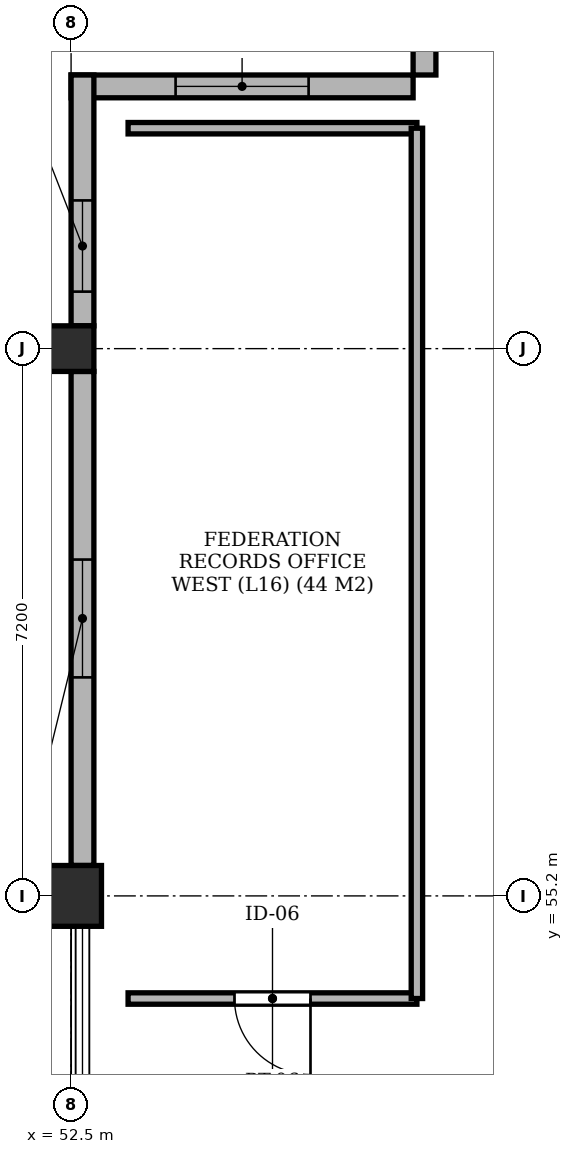
"""IFC4 building model, lengths in metres.
Left out: names, types, materials, properties, quantities, classifications, styles, units other than length and angle.
Written with IfcOpenShell. Run it as: python <this file> out.ifc"""

import sys

from ifc_helpers import new_model, si_unit, direction, frame, frame_2d, origin, origin_2d, place, context, subcontext, project, spatial, rectangle, extrude, element, fill, save


model = new_model("IFC4")
c1 = context("Model", 3, precision=1e-05, world=origin(), true_north=direction((0.0, 1.0)))
c2 = subcontext(c1, "Body", "Model", "MODEL_VIEW")
j1 = project(units=[si_unit("LENGTHUNIT", "METRE"), si_unit("PLANEANGLEUNIT", "RADIAN")], contexts=[c1])
p1 = place(None, origin())
s1 = spatial("IfcSite", under=j1, at=p1, CompositionType="ELEMENT")
p2 = place(p1, origin())
s2 = spatial("IfcBuilding", under=s1, at=p2, CompositionType="ELEMENT")
p3 = place(p2, frame((0.0, 0.0, 63.3)))
s3 = spatial("IfcBuildingStorey", under=s2, at=p3, CompositionType="ELEMENT", Elevation=63.3)
p4 = place(p3, frame((52.5, 55.2, -0.21), z_axis=(0.0, 0.0, 1.0), x_axis=(1.0, 0.0, 0.0)))
e1 = element("IfcColumn", 1, at=p4, inside=s3, PredefinedType="COLUMN", context=c2, shape_type="SweptSolid", body=[
    extrude(rectangle(XDim=0.8, YDim=0.8, at=origin_2d()), origin(), (0.0, 0.0, 1.0), 3.22),
])
p5 = place(p3, frame((52.5, 62.4, -0.21), z_axis=(0.0, 0.0, 1.0), x_axis=(1.0, 0.0, 0.0)))
e2 = element("IfcColumn", 2, at=p5, inside=s3, PredefinedType="COLUMN", context=c2, shape_type="SweptSolid", body=[
    extrude(rectangle(XDim=0.6, YDim=0.6, at=origin_2d()), origin(), (0.0, 0.0, 1.0), 3.22),
])
p6 = place(p3, frame((57.15, 69.6, 0.0), z_axis=(0.0, 0.0, 1.0), x_axis=(0.0, -1.0, 0.0)))
e3 = element("IfcWall", 3, at=p6, inside=s3, PredefinedType="SOLIDWALL", context=c2, shape_type="SweptSolid", body=[
    extrude(rectangle(XDim=3.6, YDim=0.3, at=frame_2d((1.8, 0.0))), origin(), (0.0, 0.0, 1.0), 2.53),
])
p7 = place(p6, frame((1.2, 0.0, 0.62)))
e4 = element("IfcOpeningElement", 4, at=p7, cuts=e3, PredefinedType="OPENING", context=c2, shape_type="SweptSolid", body=[
    extrude(rectangle(XDim=1.2, YDim=1.7, at=frame_2d((0.6, 0.85))), frame((0.0, 0.162, 0.0), z_axis=(0.0, -1.0, 0.0), x_axis=(1.0, 0.0, 0.0)), (0.0, 0.0, 1.0), 0.324),
])
p8 = place(p3, frame((57.0, 65.85, 0.0), z_axis=(0.0, 0.0, 1.0), x_axis=(-1.0, 0.0, 0.0)))
e5 = element("IfcWall", 5, at=p8, inside=s3, PredefinedType="SOLIDWALL", context=c2, shape_type="SweptSolid", body=[
    extrude(rectangle(XDim=4.5, YDim=0.3, at=frame_2d((2.25, 0.0))), origin(), (0.0, 0.0, 1.0), 2.53),
])
p9 = place(p8, frame((1.375, 0.0, 0.62)))
e6 = element("IfcOpeningElement", 6, at=p9, cuts=e5, PredefinedType="OPENING", context=c2, shape_type="SweptSolid", body=[
    extrude(rectangle(XDim=1.75, YDim=1.81, at=frame_2d((0.875, 0.905))), frame((0.0, 0.162, 0.0), z_axis=(0.0, -1.0, 0.0), x_axis=(1.0, 0.0, 0.0)), (0.0, 0.0, 1.0), 0.324),
])
p10 = place(p3, frame((52.65, 66.0, 0.0), z_axis=(0.0, 0.0, 1.0), x_axis=(0.0, -1.0, 0.0)))
e7 = element("IfcWall", 7, at=p10, inside=s3, PredefinedType="SOLIDWALL", context=c2, shape_type="SweptSolid", body=[
    extrude(rectangle(XDim=3.3, YDim=0.3, at=frame_2d((1.65, 0.0))), origin(), (0.0, 0.0, 1.0), 2.53),
])
p11 = place(p10, frame((1.65, 0.0, 0.62)))
e8 = element("IfcOpeningElement", 8, at=p11, cuts=e7, PredefinedType="OPENING", context=c2, shape_type="SweptSolid", body=[
    extrude(rectangle(XDim=1.2, YDim=1.65, at=frame_2d((0.6, 0.825))), frame((0.0, 0.162, 0.0), z_axis=(0.0, -1.0, 0.0), x_axis=(1.0, 0.0, 0.0)), (0.0, 0.0, 1.0), 0.324),
])
p12 = place(p3, frame((52.65, 62.1, 0.0), z_axis=(0.0, 0.0, 1.0), x_axis=(0.0, -1.0, 0.0)))
e9 = element("IfcWall", 9, at=p12, inside=s3, PredefinedType="SOLIDWALL", context=c2, shape_type="SweptSolid", body=[
    extrude(rectangle(XDim=6.5, YDim=0.3, at=frame_2d((3.25, 0.0))), origin(), (0.0, 0.0, 1.0), 2.53),
])
p13 = place(p12, frame((2.475, 0.0, 0.62)))
e10 = element("IfcOpeningElement", 10, at=p13, cuts=e9, PredefinedType="OPENING", context=c2, shape_type="SweptSolid", body=[
    extrude(rectangle(XDim=1.55, YDim=1.81, at=frame_2d((0.775, 0.905))), frame((0.0, 0.162, 0.0), z_axis=(0.0, -1.0, 0.0), x_axis=(1.0, 0.0, 0.0)), (0.0, 0.0, 1.0), 0.324),
])
p14 = place(p3, frame((53.25, 53.85, 0.0), z_axis=(0.0, 0.0, 1.0), x_axis=(1.0, 0.0, 0.0)))
e11 = element("IfcWall", 11, at=p14, inside=s3, PredefinedType="PARTITIONING", context=c2, shape_type="SweptSolid", body=[
    extrude(rectangle(XDim=3.8, YDim=0.15, at=frame_2d((1.9, 0.0))), origin(), (0.0, 0.0, 1.0), 2.53),
])
p15 = place(p14, frame((1.4, 0.0, 0.0)))
e12 = element("IfcOpeningElement", 12, at=p15, cuts=e11, PredefinedType="OPENING", context=c2, shape_type="SweptSolid", body=[
    extrude(rectangle(XDim=1.0, YDim=2.15, at=frame_2d((0.5, 1.075))), frame((0.0, 0.087, 0.0), z_axis=(0.0, -1.0, 0.0), x_axis=(1.0, 0.0, 0.0)), (0.0, 0.0, 1.0), 0.174),
])
p16 = place(p3, frame((53.25, 65.3, 0.0), z_axis=(0.0, 0.0, 1.0), x_axis=(1.0, 0.0, 0.0)))
e13 = element("IfcWall", 13, at=p16, inside=s3, PredefinedType="PARTITIONING", context=c2, shape_type="SweptSolid", body=[
    extrude(rectangle(XDim=3.8, YDim=0.15, at=frame_2d((1.9, 0.0))), origin(), (0.0, 0.0, 1.0), 2.53),
])
p17 = place(p3, frame((57.05, 53.85, 0.0), z_axis=(0.0, 0.0, 1.0), x_axis=(0.0, 1.0, 0.0)))
e14 = element("IfcWall", 14, at=p17, inside=s3, PredefinedType="PARTITIONING", context=c2, shape_type="SweptSolid", body=[
    extrude(rectangle(XDim=11.45, YDim=0.15, at=frame_2d((5.725, 0.0))), origin(), (0.0, 0.0, 1.0), 2.53),
])
p18 = place(p9, origin())
e15 = element("IfcWindow", 15, at=p18, inside=s3, PartitioningType="SINGLE_PANEL", PredefinedType="WINDOW", context=c2, shape_type="SweptSolid", body=[
    extrude(rectangle(XDim=1.75, YDim=1.81, at=frame_2d((0.875, 0.905))), frame((0.0, 0.03, 0.0), z_axis=(0.0, -1.0, 0.0), x_axis=(1.0, 0.0, 0.0)), (0.0, 0.0, 1.0), 0.06),
])
fill(e6, e15)
p19 = place(p11, origin())
e16 = element("IfcWindow", 16, at=p19, inside=s3, PartitioningType="SINGLE_PANEL", PredefinedType="WINDOW", context=c2, shape_type="SweptSolid", body=[
    extrude(rectangle(XDim=1.2, YDim=1.65, at=frame_2d((0.6, 0.825))), frame((0.0, 0.03, 0.0), z_axis=(0.0, -1.0, 0.0), x_axis=(1.0, 0.0, 0.0)), (0.0, 0.0, 1.0), 0.06),
])
fill(e8, e16)
p20 = place(p13, origin())
e17 = element("IfcWindow", 17, at=p20, inside=s3, PartitioningType="SINGLE_PANEL", PredefinedType="WINDOW", context=c2, shape_type="SweptSolid", body=[
    extrude(rectangle(XDim=1.55, YDim=1.81, at=frame_2d((0.775, 0.905))), frame((0.0, 0.03, 0.0), z_axis=(0.0, -1.0, 0.0), x_axis=(1.0, 0.0, 0.0)), (0.0, 0.0, 1.0), 0.06),
])
fill(e10, e17)
p21 = place(p15, frame((1.0, 0.0, 0.0), z_axis=(0.0, 0.0, 1.0), x_axis=(-1.0, 0.0, 0.0)))
e18 = element("IfcDoor", 18, at=p21, inside=s3, OperationType="SINGLE_SWING_RIGHT", PredefinedType="DOOR", context=c2, shape_type="SweptSolid", body=[
    extrude(rectangle(XDim=1.0, YDim=2.15, at=frame_2d((0.5, 1.075))), frame((0.0, 0.025, 0.0), z_axis=(0.0, -1.0, 0.0), x_axis=(1.0, 0.0, 0.0)), (0.0, 0.0, 1.0), 0.05),
])
fill(e12, e18)
save(model, sys.argv[1])
